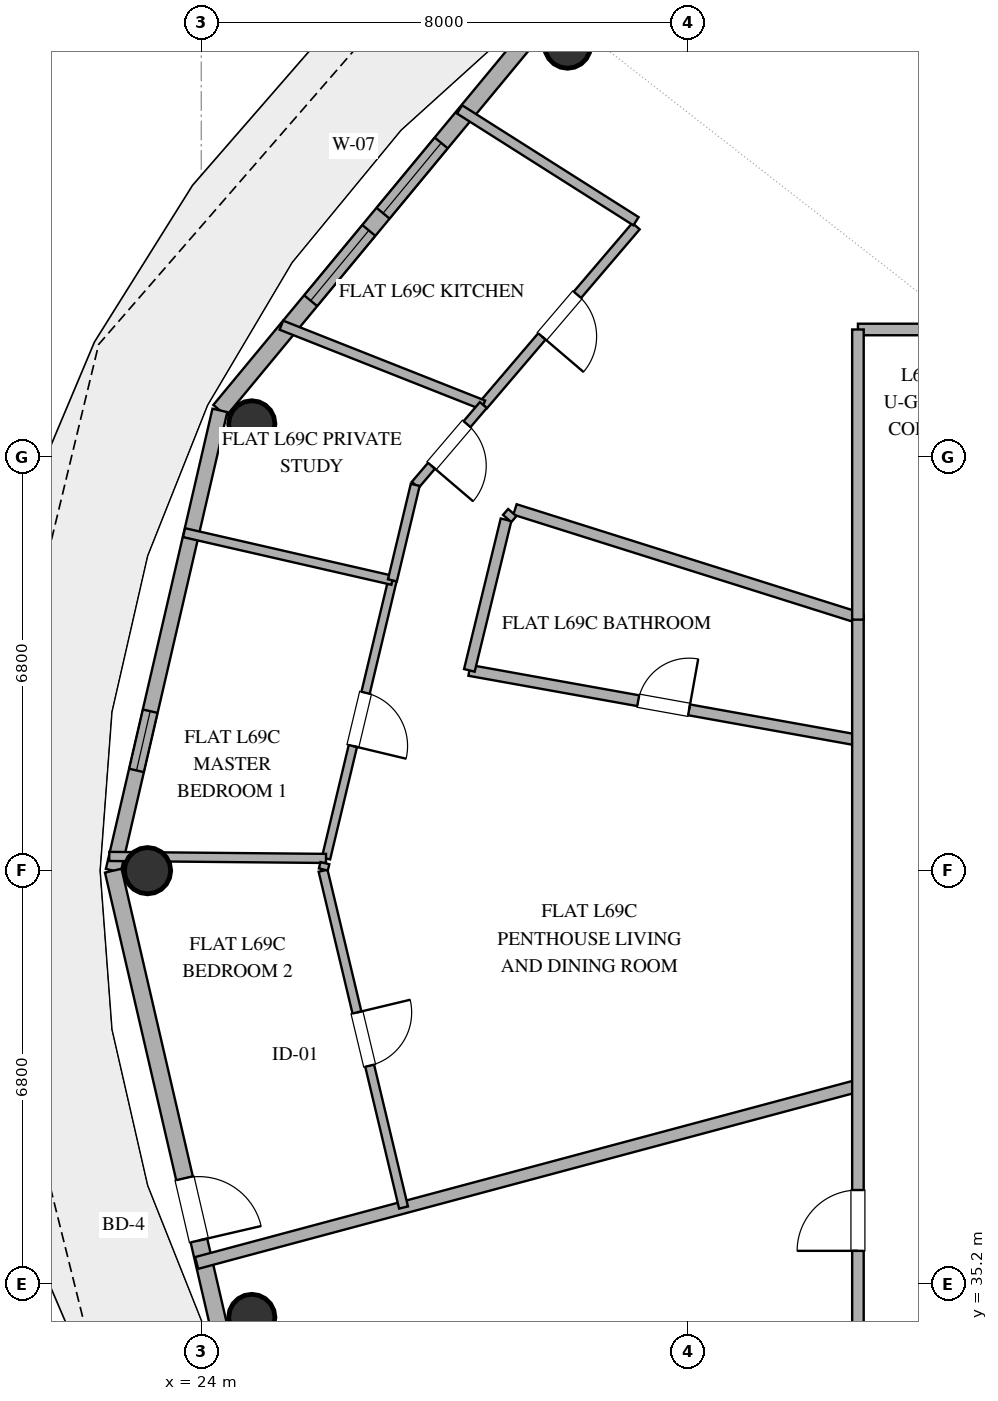
"""IFC4 building model, lengths in metres.
Left out: names, types, materials, properties, quantities, classifications, styles, units other than length and angle.
Written with IfcOpenShell. Run it as: python <this file> out.ifc"""

import sys

from ifc_helpers import new_model, si_unit, direction, frame, frame_2d, origin, origin_2d, place, context, subcontext, project, spatial, rectangle, hollow_circle, extrude, element, fill, save


model = new_model("IFC4")
c1 = context("Model", 3, precision=1e-05, world=origin(), true_north=direction((0.0, 1.0)))
c2 = subcontext(c1, "Body", "Model", "MODEL_VIEW")
j1 = project(units=[si_unit("LENGTHUNIT", "METRE"), si_unit("PLANEANGLEUNIT", "RADIAN")], contexts=[c1])
p1 = place(None, origin())
s1 = spatial("IfcSite", under=j1, at=p1, CompositionType="ELEMENT")
p2 = place(p1, origin())
s2 = spatial("IfcBuilding", under=s1, at=p2, CompositionType="ELEMENT")
p3 = place(p2, frame((0.0, 0.0, 269.4)))
s3 = spatial("IfcBuildingStorey", under=s2, at=p3, CompositionType="ELEMENT", Elevation=269.4)
for number, where, z_axis, x_axis in (
    (1, (30.025, 55.576, 0.0), (0.0, 0.0, 1.0), (1.0, 0.0, 0.0)),
    (2, (24.831, 49.347, 0.0), (0.0, 0.0, 1.0), (1.0, 0.0, 0.0)),
    (3, (23.117, 42.0, 0.0), (0.0, 0.0, 1.0), (1.0, 0.0, 0.0)),
    (4, (24.831, 34.653, 0.0), (0.0, 0.0, 1.0), (1.0, 0.0, 0.0)),
):
    element("IfcColumn", number, at=place(p3, frame(where, z_axis=z_axis, x_axis=x_axis)), inside=s3, PredefinedType="COLUMN", context=c2, shape_type="SweptSolid", body=[
        extrude(hollow_circle(Radius=0.381, WallThickness=0.025, at=origin_2d()), origin(), (0.0, 0.0, 1.0), 3.37),
    ])
p4 = place(p3, frame((29.617, 55.987, 0.0), z_axis=(0.0, 0.0, 1.0), x_axis=(-0.63761509934, -0.770355103243, 0.0)))
e5 = element("IfcWall", 5, at=p4, inside=s3, PredefinedType="SOLIDWALL", context=c2, shape_type="SweptSolid", body=[
    extrude(rectangle(XDim=8.33, YDim=0.28, at=frame_2d((4.165, 0.0))), origin(), (0.0, 0.0, 1.0), 3.37),
])
p5 = place(p4, frame((2.621, 0.0, 0.85)))
e6 = element("IfcOpeningElement", 6, at=p5, cuts=e5, PredefinedType="OPENING", context=c2, shape_type="SweptSolid", body=[
    extrude(rectangle(XDim=1.5, YDim=1.8, at=frame_2d((0.75, 0.9))), frame((0.0, 0.15, 0.0), z_axis=(0.0, -1.0, 0.0), x_axis=(1.0, 0.0, 0.0)), (0.0, 0.0, 1.0), 0.3),
])
p6 = place(p4, frame((4.488, 0.0, 0.85)))
e7 = element("IfcOpeningElement", 7, at=p6, cuts=e5, PredefinedType="OPENING", context=c2, shape_type="SweptSolid", body=[
    extrude(rectangle(XDim=1.5, YDim=1.8, at=frame_2d((0.75, 0.9))), frame((0.0, 0.15, 0.0), z_axis=(0.0, -1.0, 0.0), x_axis=(1.0, 0.0, 0.0)), (0.0, 0.0, 1.0), 0.3),
])
p7 = place(p3, frame((24.306, 49.57, 0.0), z_axis=(0.0, 0.0, 1.0), x_axis=(-0.225635078214, -0.974211892495, 0.0)))
e8 = element("IfcWall", 8, at=p7, inside=s3, PredefinedType="SOLIDWALL", context=c2, shape_type="SweptSolid", body=[
    extrude(rectangle(XDim=7.77, YDim=0.25, at=frame_2d((3.885, 0.0))), origin(), (0.0, 0.0, 1.0), 3.37),
])
p8 = place(p7, frame((5.078, 0.0, 1.42)))
e9 = element("IfcOpeningElement", 9, at=p8, cuts=e8, PredefinedType="OPENING", context=c2, shape_type="SweptSolid", body=[
    extrude(rectangle(XDim=1.0, YDim=1.05, at=frame_2d((0.5, 0.525))), frame((0.0, 0.135, 0.0), z_axis=(0.0, -1.0, 0.0), x_axis=(1.0, 0.0, 0.0)), (0.0, 0.0, 1.0), 0.27),
])
p9 = place(p3, frame((22.553, 42.0, 0.0), z_axis=(0.0, 0.0, 1.0), x_axis=(0.225635078214, -0.974211892495, 0.0)))
e10 = element("IfcWall", 10, at=p9, inside=s3, PredefinedType="SOLIDWALL", context=c2, shape_type="SweptSolid", body=[
    extrude(rectangle(XDim=7.77, YDim=0.28, at=frame_2d((3.885, 0.0))), origin(), (0.0, 0.0, 1.0), 3.37),
])
p10 = place(p9, frame((5.192, 0.0, 0.0)))
e11 = element("IfcOpeningElement", 11, at=p10, cuts=e10, PredefinedType="OPENING", context=c2, shape_type="SweptSolid", body=[
    extrude(rectangle(XDim=1.05, YDim=2.2, at=frame_2d((0.525, 1.1))), frame((0.0, 0.15, 0.0), z_axis=(0.0, -1.0, 0.0), x_axis=(1.0, 0.0, 0.0)), (0.0, 0.0, 1.0), 0.3),
])
p11 = place(p3, frame((34.8, 50.9, 0.0), z_axis=(0.0, 0.0, 1.0), x_axis=(1.0, 0.0, 0.0)))
e12 = element("IfcWall", 12, at=p11, inside=s3, PredefinedType="PARTITIONING", context=c2, shape_type="SweptSolid", body=[
    extrude(rectangle(XDim=16.473, YDim=0.19, at=frame_2d((8.237, 0.0))), origin(), (0.0, 0.0, 1.0), 2.73),
])
p12 = place(p11, frame((10.196, 0.0, 0.0)))
e13 = element("IfcOpeningElement", 13, at=p12, cuts=e12, PredefinedType="OPENING", context=c2, shape_type="SweptSolid", body=[
    extrude(rectangle(XDim=1.0, YDim=2.2, at=frame_2d((0.5, 1.1))), frame((0.0, 0.105, 0.0), z_axis=(0.0, -1.0, 0.0), x_axis=(1.0, 0.0, 0.0)), (0.0, 0.0, 1.0), 0.21),
])
p13 = place(p11, frame((2.387, 0.0, 0.0)))
e14 = element("IfcOpeningElement", 14, at=p13, cuts=e12, PredefinedType="OPENING", context=c2, shape_type="SweptSolid", body=[
    extrude(rectangle(XDim=1.0, YDim=2.2, at=frame_2d((0.5, 1.1))), frame((0.0, 0.105, 0.0), z_axis=(0.0, -1.0, 0.0), x_axis=(1.0, 0.0, 0.0)), (0.0, 0.0, 1.0), 0.21),
])
p14 = place(p3, frame((23.924, 35.549, 0.0), z_axis=(0.0, 0.0, 1.0), x_axis=(0.965923661364, 0.258827124578, 0.0)))
e15 = element("IfcWall", 15, at=p14, inside=s3, PredefinedType="PARTITIONING", context=c2, shape_type="SweptSolid", body=[
    extrude(rectangle(XDim=11.26, YDim=0.2, at=frame_2d((5.63, 0.0))), origin(), (0.0, 0.0, 1.0), 2.73),
])
p15 = place(p3, frame((28.409, 45.294, 0.0), z_axis=(0.0, 0.0, 1.0), x_axis=(0.984253263435, -0.176764004867, 0.0)))
e16 = element("IfcWall", 16, at=p15, inside=s3, PredefinedType="PLUMBINGWALL", context=c2, shape_type="SweptSolid", body=[
    extrude(rectangle(XDim=6.493, YDim=0.18, at=frame_2d((3.247, 0.0))), origin(), (0.0, 0.0, 1.0), 2.73),
])
p16 = place(p15, frame((2.821, 0.0, 0.0)))
e17 = element("IfcOpeningElement", 17, at=p16, cuts=e16, PredefinedType="OPENING", context=c2, shape_type="SweptSolid", body=[
    extrude(rectangle(XDim=0.85, YDim=2.1, at=frame_2d((0.425, 1.05))), frame((0.0, 0.1, 0.0), z_axis=(0.0, -1.0, 0.0), x_axis=(1.0, 0.0, 0.0)), (0.0, 0.0, 1.0), 0.2),
])
p17 = place(p3, frame((40.532, 50.9, 0.0), z_axis=(0.0, 0.0, 1.0), x_axis=(-0.642777155779, 0.766053214868, 0.0)))
e18 = element("IfcWall", 18, at=p17, inside=s3, PredefinedType="PARTITIONING", context=c2, shape_type="SweptSolid", body=[
    extrude(rectangle(XDim=9.868, YDim=0.2, at=frame_2d((4.934, 0.0))), origin(), (0.0, 0.0, 1.0), 2.73),
])
p18 = place(p3, frame((34.8, 46.162, 0.0), z_axis=(0.0, 0.0, 1.0), x_axis=(-0.953717336958, 0.3007045746, 0.0)))
e19 = element("IfcWall", 19, at=p18, inside=s3, PredefinedType="PLUMBINGWALL", context=c2, shape_type="SweptSolid", body=[
    extrude(rectangle(XDim=5.914, YDim=0.18, at=frame_2d((2.957, 0.0))), origin(), (0.0, 0.0, 1.0), 2.73),
])
p19 = place(p3, frame((34.8, 34.0, 0.0), z_axis=(0.0, 0.0, 1.0), x_axis=(0.0, 1.0, 0.0)))
e20 = element("IfcWall", 20, at=p19, inside=s3, PredefinedType="PARTITIONING", context=c2, shape_type="SweptSolid", body=[
    extrude(rectangle(XDim=12.196, YDim=0.19, at=frame_2d((6.098, 0.0))), origin(), (0.0, 0.0, 1.0), 2.73),
])
p20 = place(p19, frame((1.748, 0.0, 0.0)))
e21 = element("IfcOpeningElement", 21, at=p20, cuts=e20, PredefinedType="OPENING", context=c2, shape_type="SweptSolid", body=[
    extrude(rectangle(XDim=1.0, YDim=2.2, at=frame_2d((0.5, 1.1))), frame((0.0, 0.105, 0.0), z_axis=(0.0, -1.0, 0.0), x_axis=(1.0, 0.0, 0.0)), (0.0, 0.0, 1.0), 0.21),
])
p21 = place(p3, frame((26.004, 42.0, 0.0), z_axis=(0.0, 0.0, 1.0), x_axis=(0.232304342064, -0.972643147644, 0.0)))
e22 = element("IfcWall", 22, at=p21, inside=s3, PredefinedType="PARTITIONING", context=c2, shape_type="SweptSolid", body=[
    extrude(rectangle(XDim=5.695, YDim=0.15, at=frame_2d((2.848, 0.0))), origin(), (0.0, 0.0, 1.0), 2.73),
])
p22 = place(p21, frame((2.398, 0.0, 0.0)))
e23 = element("IfcOpeningElement", 23, at=p22, cuts=e22, PredefinedType="OPENING", context=c2, shape_type="SweptSolid", body=[
    extrude(rectangle(XDim=0.9, YDim=2.1, at=frame_2d((0.45, 1.05))), frame((0.0, 0.085, 0.0), z_axis=(0.0, -1.0, 0.0), x_axis=(1.0, 0.0, 0.0)), (0.0, 0.0, 1.0), 0.17),
])
p23 = place(p3, frame((34.8, 46.128, 0.0), z_axis=(0.0, 0.0, 1.0), x_axis=(0.0, 1.0, 0.0)))
e24 = element("IfcWall", 24, at=p23, inside=s3, PredefinedType="PARTITIONING", context=c2, shape_type="SweptSolid", body=[
    extrude(rectangle(XDim=4.771, YDim=0.19, at=frame_2d((2.386, 0.0))), origin(), (0.0, 0.0, 1.0), 2.73),
])
p24 = place(p3, frame((27.144, 46.775, 0.0), z_axis=(0.0, 0.0, 1.0), x_axis=(-0.232320140936, -0.972639374134, 0.0)))
e25 = element("IfcWall", 25, at=p24, inside=s3, PredefinedType="PARTITIONING", context=c2, shape_type="SweptSolid", body=[
    extrude(rectangle(XDim=4.702, YDim=0.14, at=frame_2d((2.351, 0.0))), origin(), (0.0, 0.0, 1.0), 2.73),
])
p25 = place(p24, frame((1.901, 0.0, 0.0)))
e26 = element("IfcOpeningElement", 26, at=p25, cuts=e25, PredefinedType="OPENING", context=c2, shape_type="SweptSolid", body=[
    extrude(rectangle(XDim=0.9, YDim=2.1, at=frame_2d((0.45, 1.05))), frame((0.0, 0.08, 0.0), z_axis=(0.0, -1.0, 0.0), x_axis=(1.0, 0.0, 0.0)), (0.0, 0.0, 1.0), 0.16),
])
p26 = place(p3, frame((31.15, 52.599, 0.0), z_axis=(0.0, 0.0, 1.0), x_axis=(-0.649199141965, -0.760618481285, 0.0)))
e27 = element("IfcWall", 27, at=p26, inside=s3, PredefinedType="PLUMBINGWALL", context=c2, shape_type="SweptSolid", body=[
    extrude(rectangle(XDim=3.867, YDim=0.16, at=frame_2d((1.934, 0.0))), origin(), (0.0, 0.0, 1.0), 2.73),
])
p27 = place(p26, frame((1.484, 0.0, 0.0)))
e28 = element("IfcOpeningElement", 28, at=p27, cuts=e27, PredefinedType="OPENING", context=c2, shape_type="SweptSolid", body=[
    extrude(rectangle(XDim=0.9, YDim=2.1, at=frame_2d((0.45, 1.05))), frame((0.0, 0.09, 0.0), z_axis=(0.0, -1.0, 0.0), x_axis=(1.0, 0.0, 0.0)), (0.0, 0.0, 1.0), 0.18),
])
p28 = place(p3, frame((25.318, 50.971, 0.0), z_axis=(0.0, 0.0, 1.0), x_axis=(0.929912335167, -0.36778125143, 0.0)))
e29 = element("IfcWall", 29, at=p28, inside=s3, PredefinedType="PLUMBINGWALL", context=c2, shape_type="SweptSolid", body=[
    extrude(rectangle(XDim=3.571, YDim=0.16, at=frame_2d((1.786, 0.0))), origin(), (0.0, 0.0, 1.0), 2.73),
])
p29 = place(p3, frame((22.487, 42.234, 0.0), z_axis=(0.0, 0.0, 1.0), x_axis=(0.999957889833, -0.009177067135, 0.0)))
e30 = element("IfcWall", 30, at=p29, inside=s3, PredefinedType="PARTITIONING", context=c2, shape_type="SweptSolid", body=[
    extrude(rectangle(XDim=3.565, YDim=0.15, at=frame_2d((1.782, 0.0))), origin(), (0.0, 0.0, 1.0), 2.73),
])
p30 = place(p3, frame((23.717, 47.559, 0.0), z_axis=(0.0, 0.0, 1.0), x_axis=(0.974786474408, -0.223139708056, 0.0)))
e31 = element("IfcWall", 31, at=p30, inside=s3, PredefinedType="PARTITIONING", context=c2, shape_type="SweptSolid", body=[
    extrude(rectangle(XDim=3.515, YDim=0.15, at=frame_2d((1.758, 0.0))), origin(), (0.0, 0.0, 1.0), 2.73),
])
p31 = place(p3, frame((28.249, 54.519, 0.0), z_axis=(0.0, 0.0, 1.0), x_axis=(0.844643402302, -0.535329359318, 0.0)))
e32 = element("IfcWall", 32, at=p31, inside=s3, PredefinedType="PLUMBINGWALL", context=c2, shape_type="SweptSolid", body=[
    extrude(rectangle(XDim=3.435, YDim=0.16, at=frame_2d((1.718, 0.0))), origin(), (0.0, 0.0, 1.0), 2.73),
])
p32 = place(p3, frame((29.012, 47.771, 0.0), z_axis=(0.0, 0.0, 1.0), x_axis=(-0.236537291112, -0.971622411183, 0.0)))
e33 = element("IfcWall", 33, at=p32, inside=s3, PredefinedType="PLUMBINGWALL", context=c2, shape_type="SweptSolid", body=[
    extrude(rectangle(XDim=2.549, YDim=0.18, at=frame_2d((1.275, 0.0))), origin(), (0.0, 0.0, 1.0), 2.73),
])
p33 = place(p3, frame((28.639, 49.657, 0.0), z_axis=(0.0, 0.0, 1.0), x_axis=(-0.649228439324, -0.760593474579, 0.0)))
e34 = element("IfcWall", 34, at=p33, inside=s3, PredefinedType="PARTITIONING", context=c2, shape_type="SweptSolid", body=[
    extrude(rectangle(XDim=1.725, YDim=0.15, at=frame_2d((0.863, 0.0))), origin(), (0.0, 0.0, 1.0), 2.73),
])
p34 = place(p33, frame((0.413, 0.0, 0.0)))
e35 = element("IfcOpeningElement", 35, at=p34, cuts=e34, PredefinedType="OPENING", context=c2, shape_type="SweptSolid", body=[
    extrude(rectangle(XDim=0.9, YDim=2.1, at=frame_2d((0.45, 1.05))), frame((0.0, 0.085, 0.0), z_axis=(0.0, -1.0, 0.0), x_axis=(1.0, 0.0, 0.0)), (0.0, 0.0, 1.0), 0.17),
])
p35 = place(p3, frame((27.519, 48.345, 0.0), z_axis=(0.0, 0.0, 1.0), x_axis=(-0.232274682056, -0.972650231109, 0.0)))
e36 = element("IfcWall", 36, at=p35, inside=s3, PredefinedType="PARTITIONING", context=c2, shape_type="SweptSolid", body=[
    extrude(rectangle(XDim=1.615, YDim=0.15, at=frame_2d((0.807, 0.0))), origin(), (0.0, 0.0, 1.0), 2.73),
])
p36 = place(p3, frame((29.115, 47.889, 0.0), z_axis=(0.0, 0.0, 1.0), x_axis=(-0.657024535632, -0.753869192618, 0.0)))
e37 = element("IfcWall", 37, at=p36, inside=s3, PredefinedType="PLUMBINGWALL", context=c2, shape_type="SweptSolid", body=[
    extrude(rectangle(XDim=0.129, YDim=0.18, at=frame_2d((0.064, 0.0))), origin(), (0.0, 0.0, 1.0), 2.73),
])
p37 = place(p3, frame((26.033, 42.124, 0.0), z_axis=(0.0, 0.0, 1.0), x_axis=(-0.232339008139, -0.972634867407, 0.0)))
e38 = element("IfcWall", 38, at=p37, inside=s3, PredefinedType="PARTITIONING", context=c2, shape_type="SweptSolid", body=[
    extrude(rectangle(XDim=0.107, YDim=0.15, at=frame_2d((0.054, 0.0))), origin(), (0.0, 0.0, 1.0), 2.73),
])
p38 = place(p5, origin())
e39 = element("IfcWindow", 39, at=p38, inside=s3, PartitioningType="SINGLE_PANEL", PredefinedType="WINDOW", context=c2, shape_type="SweptSolid", body=[
    extrude(rectangle(XDim=1.5, YDim=1.8, at=frame_2d((0.75, 0.9))), frame((0.0, 0.03, 0.0), z_axis=(0.0, -1.0, 0.0), x_axis=(1.0, 0.0, 0.0)), (0.0, 0.0, 1.0), 0.06),
])
fill(e6, e39)
p39 = place(p6, origin())
e40 = element("IfcWindow", 40, at=p39, inside=s3, PartitioningType="SINGLE_PANEL", PredefinedType="WINDOW", context=c2, shape_type="SweptSolid", body=[
    extrude(rectangle(XDim=1.5, YDim=1.8, at=frame_2d((0.75, 0.9))), frame((0.0, 0.03, 0.0), z_axis=(0.0, -1.0, 0.0), x_axis=(1.0, 0.0, 0.0)), (0.0, 0.0, 1.0), 0.06),
])
fill(e7, e40)
p40 = place(p10, origin())
e41 = element("IfcDoor", 41, at=p40, inside=s3, OperationType="SINGLE_SWING_RIGHT", PredefinedType="DOOR", context=c2, shape_type="SweptSolid", body=[
    extrude(rectangle(XDim=1.05, YDim=2.2, at=frame_2d((0.525, 1.1))), frame((0.0, 0.025, 0.0), z_axis=(0.0, -1.0, 0.0), x_axis=(1.0, 0.0, 0.0)), (0.0, 0.0, 1.0), 0.05),
])
fill(e11, e41)
p41 = place(p8, origin())
e42 = element("IfcWindow", 42, at=p41, inside=s3, PartitioningType="SINGLE_PANEL", PredefinedType="WINDOW", context=c2, shape_type="SweptSolid", body=[
    extrude(rectangle(XDim=1.0, YDim=1.05, at=frame_2d((0.5, 0.525))), frame((0.0, 0.03, 0.0), z_axis=(0.0, -1.0, 0.0), x_axis=(1.0, 0.0, 0.0)), (0.0, 0.0, 1.0), 0.06),
])
fill(e9, e42)
p42 = place(p16, origin())
e43 = element("IfcDoor", 43, at=p42, inside=s3, OperationType="SINGLE_SWING_RIGHT", PredefinedType="DOOR", context=c2, shape_type="SweptSolid", body=[
    extrude(rectangle(XDim=0.85, YDim=2.1, at=frame_2d((0.425, 1.05))), frame((0.0, 0.025, 0.0), z_axis=(0.0, -1.0, 0.0), x_axis=(1.0, 0.0, 0.0)), (0.0, 0.0, 1.0), 0.05),
])
fill(e17, e43)
p43 = place(p20, origin())
e44 = element("IfcDoor", 44, at=p43, inside=s3, OperationType="SINGLE_SWING_LEFT", PredefinedType="DOOR", context=c2, shape_type="SweptSolid", body=[
    extrude(rectangle(XDim=1.0, YDim=2.2, at=frame_2d((0.5, 1.1))), frame((0.0, 0.025, 0.0), z_axis=(0.0, -1.0, 0.0), x_axis=(1.0, 0.0, 0.0)), (0.0, 0.0, 1.0), 0.05),
])
fill(e21, e44)
p44 = place(p22, origin())
e45 = element("IfcDoor", 45, at=p44, inside=s3, OperationType="SINGLE_SWING_LEFT", PredefinedType="DOOR", context=c2, shape_type="SweptSolid", body=[
    extrude(rectangle(XDim=0.9, YDim=2.1, at=frame_2d((0.45, 1.05))), frame((0.0, 0.025, 0.0), z_axis=(0.0, -1.0, 0.0), x_axis=(1.0, 0.0, 0.0)), (0.0, 0.0, 1.0), 0.05),
])
fill(e23, e45)
p45 = place(p25, origin())
e46 = element("IfcDoor", 46, at=p45, inside=s3, OperationType="SINGLE_SWING_RIGHT", PredefinedType="DOOR", context=c2, shape_type="SweptSolid", body=[
    extrude(rectangle(XDim=0.9, YDim=2.1, at=frame_2d((0.45, 1.05))), frame((0.0, 0.025, 0.0), z_axis=(0.0, -1.0, 0.0), x_axis=(1.0, 0.0, 0.0)), (0.0, 0.0, 1.0), 0.05),
])
fill(e26, e46)
p46 = place(p27, origin())
e47 = element("IfcDoor", 47, at=p46, inside=s3, OperationType="SINGLE_SWING_RIGHT", PredefinedType="DOOR", context=c2, shape_type="SweptSolid", body=[
    extrude(rectangle(XDim=0.9, YDim=2.1, at=frame_2d((0.45, 1.05))), frame((0.0, 0.025, 0.0), z_axis=(0.0, -1.0, 0.0), x_axis=(1.0, 0.0, 0.0)), (0.0, 0.0, 1.0), 0.05),
])
fill(e28, e47)
p47 = place(p34, origin())
e48 = element("IfcDoor", 48, at=p47, inside=s3, OperationType="SINGLE_SWING_RIGHT", PredefinedType="DOOR", context=c2, shape_type="SweptSolid", body=[
    extrude(rectangle(XDim=0.9, YDim=2.1, at=frame_2d((0.45, 1.05))), frame((0.0, 0.025, 0.0), z_axis=(0.0, -1.0, 0.0), x_axis=(1.0, 0.0, 0.0)), (0.0, 0.0, 1.0), 0.05),
])
fill(e35, e48)
save(model, sys.argv[1])
